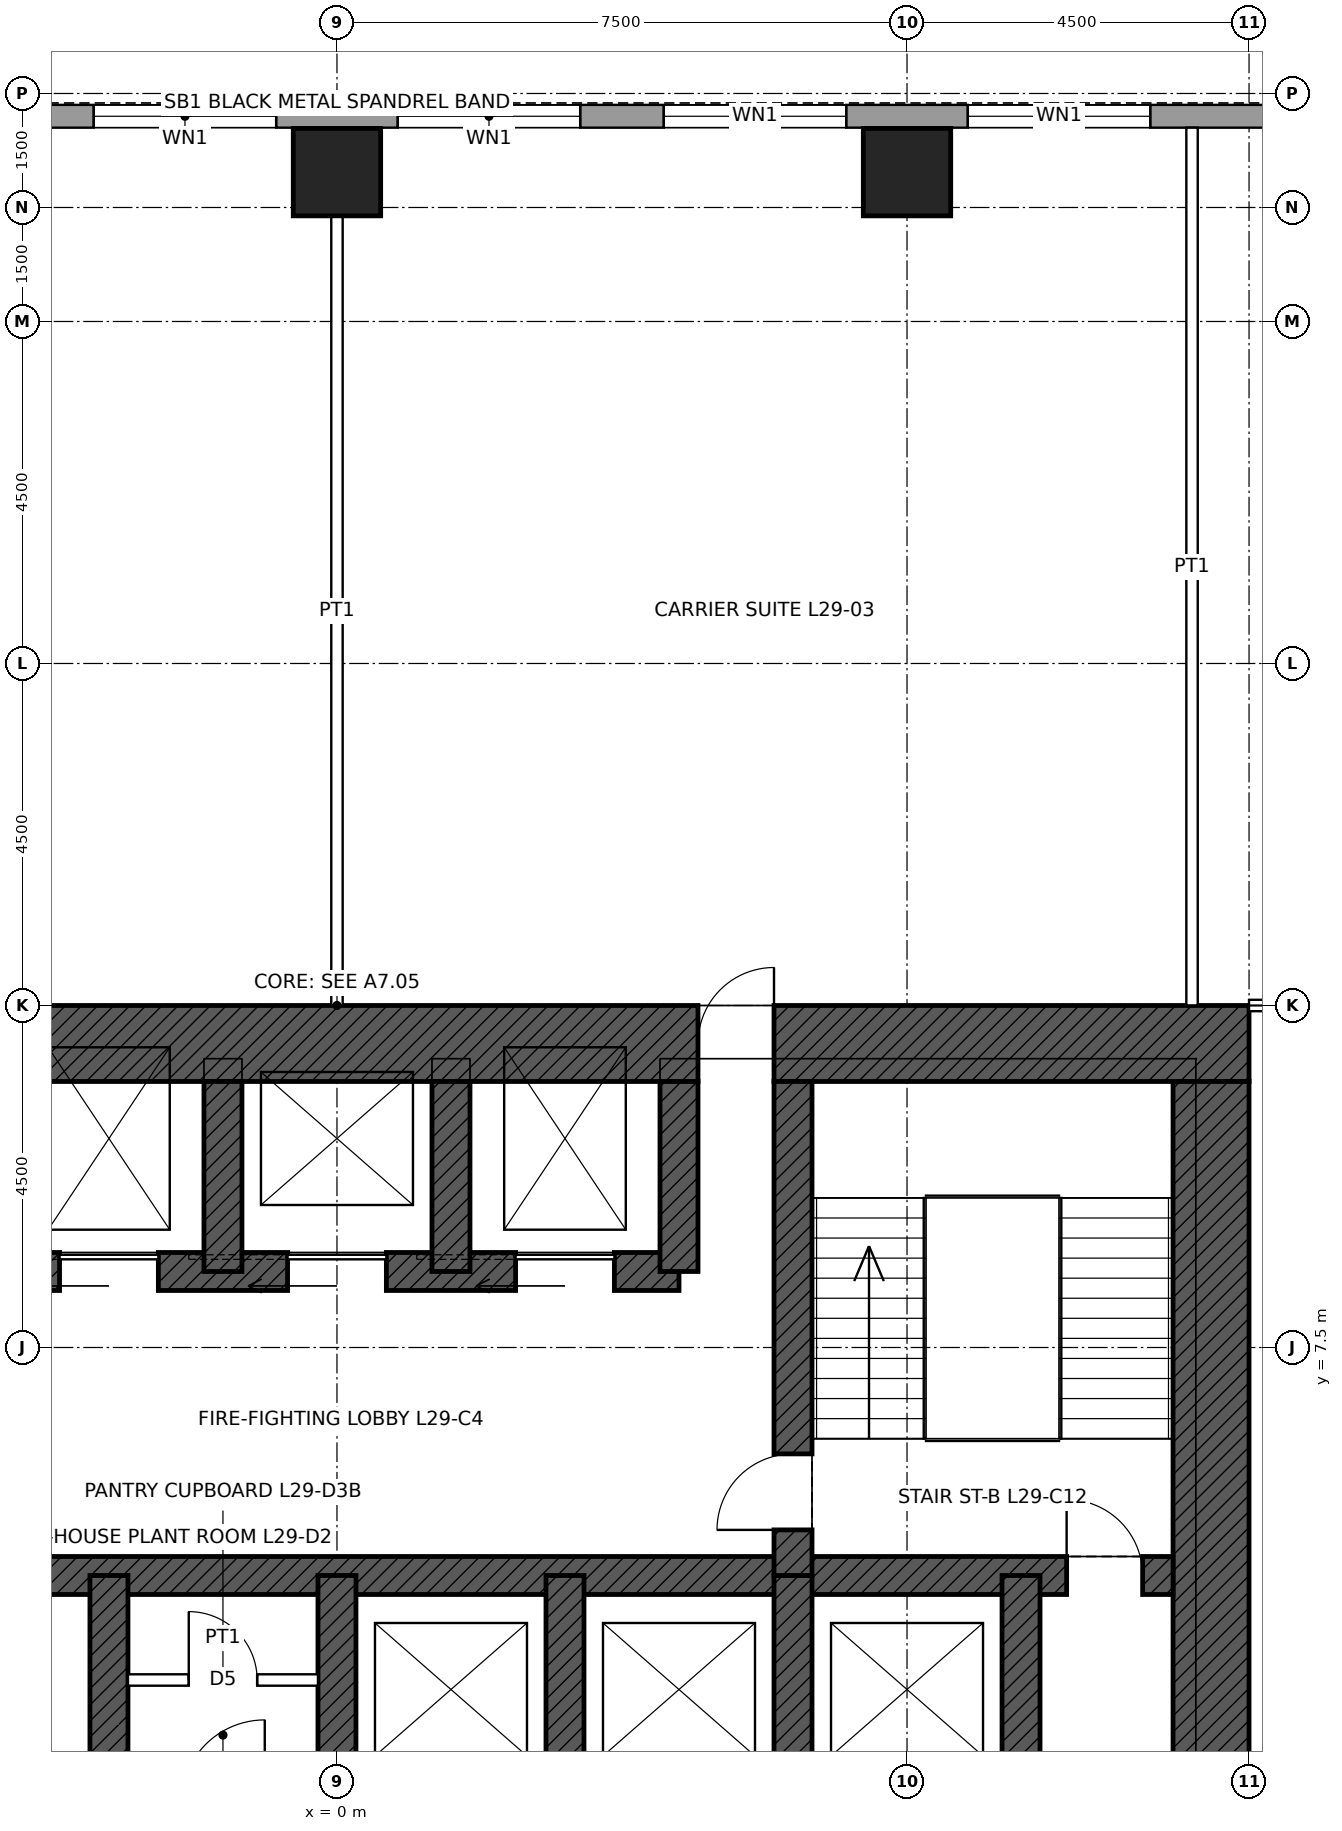
"""IFC4 building model, lengths in metres.
Left out: names, types, materials, properties, quantities, classifications, styles, units other than length and angle.
Written with IfcOpenShell. Run it as: python <this file> out.ifc"""

import sys

from ifc_helpers import new_model, si_unit, direction, frame, frame_2d, origin, origin_2d, place, context, subcontext, project, spatial, rectangle, hollow_rectangle, extrude, element, fill, save


model = new_model("IFC4")
c1 = context("Model", 3, precision=1e-05, world=origin(), true_north=direction((0.0, 1.0)))
c2 = subcontext(c1, "Body", "Model", "MODEL_VIEW")
j1 = project(units=[si_unit("LENGTHUNIT", "METRE"), si_unit("PLANEANGLEUNIT", "RADIAN")], contexts=[c1])
p1 = place(None, origin())
s1 = spatial("IfcSite", under=j1, at=p1, CompositionType="ELEMENT")
p2 = place(p1, origin())
s2 = spatial("IfcBuilding", under=s1, at=p2, CompositionType="ELEMENT")
p3 = place(p2, frame((0.0, 0.0, 144.9)))
s3 = spatial("IfcBuildingStorey", under=s2, at=p3, CompositionType="ELEMENT", Elevation=144.9)
for number, where, z_axis, x_axis in (
    (1, (0.0, 22.965, 0.0), (0.0, 0.0, 1.0), (1.0, 0.0, 0.0)),
    (2, (7.5, 22.965, 0.0), (0.0, 0.0, 1.0), (1.0, 0.0, 0.0)),
):
    element("IfcColumn", number, at=place(p3, frame(where, z_axis=z_axis, x_axis=x_axis)), inside=s3, PredefinedType="COLUMN", context=c2, shape_type="SweptSolid", body=[
        extrude(hollow_rectangle(XDim=1.15, YDim=1.15, WallThickness=0.075, at=origin_2d()), origin(), (0.0, 0.0, 1.0), 4.5),
    ])
p4 = place(p3, frame((-12.0, 11.5, 0.0), z_axis=(0.0, 0.0, 1.0), x_axis=(1.0, 0.0, 0.0)))
e3 = element("IfcWall", 3, at=p4, inside=s3, PredefinedType="SHEAR", context=c2, shape_type="SweptSolid", body=[
    extrude(rectangle(XDim=24.0, YDim=1.0, at=frame_2d((12.0, 0.0))), origin(), (0.0, 0.0, 1.0), 4.5),
])
p5 = place(p4, frame((6.25, 0.0, 0.0)))
e4 = element("IfcOpeningElement", 4, at=p5, cuts=e3, PredefinedType="OPENING", context=c2, shape_type="SweptSolid", body=[
    extrude(rectangle(XDim=1.0, YDim=2.4, at=frame_2d((0.5, 1.2))), frame((0.0, 0.51, 0.0), z_axis=(0.0, -1.0, 0.0), x_axis=(1.0, 0.0, 0.0)), (0.0, 0.0, 1.0), 1.02),
])
p6 = place(p4, frame((16.75, 0.0, 0.0)))
e5 = element("IfcOpeningElement", 5, at=p6, cuts=e3, PredefinedType="OPENING", context=c2, shape_type="SweptSolid", body=[
    extrude(rectangle(XDim=1.0, YDim=2.4, at=frame_2d((0.5, 1.2))), frame((0.0, 0.51, 0.0), z_axis=(0.0, -1.0, 0.0), x_axis=(1.0, 0.0, 0.0)), (0.0, 0.0, 1.0), 1.02),
])
p7 = place(p3, frame((11.5, 11.0, 0.0), z_axis=(0.0, 0.0, 1.0), x_axis=(0.0, -1.0, 0.0)))
e6 = element("IfcWall", 6, at=p7, inside=s3, PredefinedType="SHEAR", context=c2, shape_type="SweptSolid", body=[
    extrude(rectangle(XDim=22.0, YDim=1.0, at=frame_2d((11.0, 0.0))), origin(), (0.0, 0.0, 1.0), 4.5),
])
p8 = place(p7, frame((10.5, 0.0, 0.0)))
e7 = element("IfcOpeningElement", 7, at=p8, cuts=e6, PredefinedType="OPENING", context=c2, shape_type="SweptSolid", body=[
    extrude(rectangle(XDim=1.0, YDim=2.4, at=frame_2d((0.5, 1.2))), frame((0.0, 0.51, 0.0), z_axis=(0.0, -1.0, 0.0), x_axis=(1.0, 0.0, 0.0)), (0.0, 0.0, 1.0), 1.02),
])
p9 = place(p3, frame((-11.0, 4.5, 0.0), z_axis=(0.0, 0.0, 1.0), x_axis=(1.0, 0.0, 0.0)))
e8 = element("IfcWall", 8, at=p9, inside=s3, PredefinedType="SHEAR", context=c2, shape_type="SweptSolid", body=[
    extrude(rectangle(XDim=22.0, YDim=0.5, at=frame_2d((11.0, 0.0))), origin(), (0.0, 0.0, 1.0), 4.5),
])
p10 = place(p9, frame((0.4, 0.0, 0.0)))
e9 = element("IfcOpeningElement", 9, at=p10, cuts=e8, PredefinedType="OPENING", context=c2, shape_type="SweptSolid", body=[
    extrude(rectangle(XDim=1.0, YDim=2.1, at=frame_2d((0.5, 1.05))), frame((0.0, 0.26, 0.0), z_axis=(0.0, -1.0, 0.0), x_axis=(1.0, 0.0, 0.0)), (0.0, 0.0, 1.0), 0.52),
])
p11 = place(p9, frame((20.6, 0.0, 0.0)))
e10 = element("IfcOpeningElement", 10, at=p11, cuts=e8, PredefinedType="OPENING", context=c2, shape_type="SweptSolid", body=[
    extrude(rectangle(XDim=1.0, YDim=2.1, at=frame_2d((0.5, 1.05))), frame((0.0, 0.26, 0.0), z_axis=(0.0, -1.0, 0.0), x_axis=(1.0, 0.0, 0.0)), (0.0, 0.0, 1.0), 0.52),
])
p12 = place(p3, frame((-4.5, 8.5, 0.0), z_axis=(0.0, 0.0, 1.0), x_axis=(1.0, 0.0, 0.0)))
e11 = element("IfcWall", 11, at=p12, inside=s3, PredefinedType="SHEAR", context=c2, shape_type="SweptSolid", body=[
    extrude(rectangle(XDim=9.0, YDim=0.5, at=frame_2d((4.5, 0.0))), origin(), (0.0, 0.0, 1.0), 4.5),
])
p13 = place(p12, frame((0.85, 0.0, 0.0)))
e12 = element("IfcOpeningElement", 12, at=p13, cuts=e11, PredefinedType="OPENING", context=c2, shape_type="SweptSolid", body=[
    extrude(rectangle(XDim=1.3, YDim=2.4, at=frame_2d((0.65, 1.2))), frame((0.0, 0.26, 0.0), z_axis=(0.0, -1.0, 0.0), x_axis=(1.0, 0.0, 0.0)), (0.0, 0.0, 1.0), 0.52),
])
p14 = place(p12, frame((6.85, 0.0, 0.0)))
e13 = element("IfcOpeningElement", 13, at=p14, cuts=e11, PredefinedType="OPENING", context=c2, shape_type="SweptSolid", body=[
    extrude(rectangle(XDim=1.3, YDim=2.4, at=frame_2d((0.65, 1.2))), frame((0.0, 0.26, 0.0), z_axis=(0.0, -1.0, 0.0), x_axis=(1.0, 0.0, 0.0)), (0.0, 0.0, 1.0), 0.52),
])
p15 = place(p12, frame((3.85, 0.0, 0.0)))
e14 = element("IfcOpeningElement", 14, at=p15, cuts=e11, PredefinedType="OPENING", context=c2, shape_type="SweptSolid", body=[
    extrude(rectangle(XDim=1.3, YDim=2.4, at=frame_2d((0.65, 1.2))), frame((0.0, 0.26, 0.0), z_axis=(0.0, -1.0, 0.0), x_axis=(1.0, 0.0, 0.0)), (0.0, 0.0, 1.0), 0.52),
])
for number, where, z_axis, x_axis in (
    (15, (9.0, 1.5, 0.0), (0.0, 0.0, 1.0), (0.0, 1.0, 0.0)),
    (16, (-3.0, 1.5, 0.0), (0.0, 0.0, 1.0), (0.0, 1.0, 0.0)),
    (17, (0.0, 1.5, 0.0), (0.0, 0.0, 1.0), (0.0, 1.0, 0.0)),
    (18, (3.0, 1.5, 0.0), (0.0, 0.0, 1.0), (0.0, 1.0, 0.0)),
    (19, (6.0, 1.5, 0.0), (0.0, 0.0, 1.0), (0.0, 1.0, 0.0)),
):
    element("IfcWall", number, at=place(p3, frame(where, z_axis=z_axis, x_axis=x_axis)), inside=s3, PredefinedType="SHEAR", context=c2, shape_type="SweptSolid", body=[
        extrude(rectangle(XDim=3.0, YDim=0.5, at=frame_2d((1.5, 0.0))), origin(), (0.0, 0.0, 1.0), 4.5),
    ])
p16 = place(p3, frame((6.0, 4.5, 0.0), z_axis=(0.0, 0.0, 1.0), x_axis=(0.0, 1.0, 0.0)))
e20 = element("IfcWall", 20, at=p16, inside=s3, PredefinedType="SHEAR", context=c2, shape_type="SweptSolid", body=[
    extrude(rectangle(XDim=6.5, YDim=0.5, at=frame_2d((3.25, 0.0))), origin(), (0.0, 0.0, 1.0), 4.5),
])
p17 = place(p16, frame((0.6, 0.0, 0.0)))
e21 = element("IfcOpeningElement", 21, at=p17, cuts=e20, PredefinedType="OPENING", context=c2, shape_type="SweptSolid", body=[
    extrude(rectangle(XDim=1.0, YDim=2.1, at=frame_2d((0.5, 1.05))), frame((0.0, 0.26, 0.0), z_axis=(0.0, -1.0, 0.0), x_axis=(1.0, 0.0, 0.0)), (0.0, 0.0, 1.0), 0.52),
])
for number, where, z_axis, x_axis in (
    (22, (4.5, 8.5, 0.0), (0.0, 0.0, 1.0), (0.0, 1.0, 0.0)),
    (23, (-1.5, 8.5, 0.0), (0.0, 0.0, 1.0), (0.0, 1.0, 0.0)),
    (24, (1.5, 8.5, 0.0), (0.0, 0.0, 1.0), (0.0, 1.0, 0.0)),
):
    element("IfcWall", number, at=place(p3, frame(where, z_axis=z_axis, x_axis=x_axis)), inside=s3, PredefinedType="SHEAR", context=c2, shape_type="SweptSolid", body=[
        extrude(rectangle(XDim=2.5, YDim=0.5, at=frame_2d((1.25, 0.0))), origin(), (0.0, 0.0, 1.0), 4.5),
    ])
p18 = place(p3, frame((-16.2, 23.7, 0.0), z_axis=(0.0, 0.0, 1.0), x_axis=(1.0, 0.0, 0.0)))
e25 = element("IfcWall", 25, at=p18, inside=s3, PredefinedType="SOLIDWALL", context=c2, shape_type="SweptSolid", body=[
    extrude(rectangle(XDim=32.4, YDim=0.3, at=frame_2d((16.2, 0.0))), origin(), (0.0, 0.0, 1.0), 4.3),
])
p19 = place(p18, frame((0.95, 0.0, 1.0)))
e26 = element("IfcOpeningElement", 26, at=p19, cuts=e25, PredefinedType="OPENING", context=c2, shape_type="SweptSolid", body=[
    extrude(rectangle(XDim=1.8, YDim=1.2, at=frame_2d((0.9, 0.6))), frame((0.0, 0.16, 0.0), z_axis=(0.0, -1.0, 0.0), x_axis=(1.0, 0.0, 0.0)), (0.0, 0.0, 1.0), 0.32),
])
p20 = place(p18, frame((5.5, 0.0, 1.0)))
e27 = element("IfcOpeningElement", 27, at=p20, cuts=e25, PredefinedType="OPENING", context=c2, shape_type="SweptSolid", body=[
    extrude(rectangle(XDim=2.4, YDim=1.2, at=frame_2d((1.2, 0.6))), frame((0.0, 0.16, 0.0), z_axis=(0.0, -1.0, 0.0), x_axis=(1.0, 0.0, 0.0)), (0.0, 0.0, 1.0), 0.32),
])
p21 = place(p18, frame((9.5, 0.0, 1.0)))
e28 = element("IfcOpeningElement", 28, at=p21, cuts=e25, PredefinedType="OPENING", context=c2, shape_type="SweptSolid", body=[
    extrude(rectangle(XDim=2.4, YDim=1.2, at=frame_2d((1.2, 0.6))), frame((0.0, 0.16, 0.0), z_axis=(0.0, -1.0, 0.0), x_axis=(1.0, 0.0, 0.0)), (0.0, 0.0, 1.0), 0.32),
])
p22 = place(p18, frame((13.0, 0.0, 1.0)))
e29 = element("IfcOpeningElement", 29, at=p22, cuts=e25, PredefinedType="OPENING", context=c2, shape_type="SweptSolid", body=[
    extrude(rectangle(XDim=2.4, YDim=1.2, at=frame_2d((1.2, 0.6))), frame((0.0, 0.16, 0.0), z_axis=(0.0, -1.0, 0.0), x_axis=(1.0, 0.0, 0.0)), (0.0, 0.0, 1.0), 0.32),
])
p23 = place(p18, frame((17.0, 0.0, 1.0)))
e30 = element("IfcOpeningElement", 30, at=p23, cuts=e25, PredefinedType="OPENING", context=c2, shape_type="SweptSolid", body=[
    extrude(rectangle(XDim=2.4, YDim=1.2, at=frame_2d((1.2, 0.6))), frame((0.0, 0.16, 0.0), z_axis=(0.0, -1.0, 0.0), x_axis=(1.0, 0.0, 0.0)), (0.0, 0.0, 1.0), 0.32),
])
p24 = place(p18, frame((20.5, 0.0, 1.0)))
e31 = element("IfcOpeningElement", 31, at=p24, cuts=e25, PredefinedType="OPENING", context=c2, shape_type="SweptSolid", body=[
    extrude(rectangle(XDim=2.4, YDim=1.2, at=frame_2d((1.2, 0.6))), frame((0.0, 0.16, 0.0), z_axis=(0.0, -1.0, 0.0), x_axis=(1.0, 0.0, 0.0)), (0.0, 0.0, 1.0), 0.32),
])
p25 = place(p18, frame((24.5, 0.0, 1.0)))
e32 = element("IfcOpeningElement", 32, at=p25, cuts=e25, PredefinedType="OPENING", context=c2, shape_type="SweptSolid", body=[
    extrude(rectangle(XDim=2.4, YDim=1.2, at=frame_2d((1.2, 0.6))), frame((0.0, 0.16, 0.0), z_axis=(0.0, -1.0, 0.0), x_axis=(1.0, 0.0, 0.0)), (0.0, 0.0, 1.0), 0.32),
])
p26 = place(p18, frame((29.65, 0.0, 1.0)))
e33 = element("IfcOpeningElement", 33, at=p26, cuts=e25, PredefinedType="OPENING", context=c2, shape_type="SweptSolid", body=[
    extrude(rectangle(XDim=1.8, YDim=1.2, at=frame_2d((0.9, 0.6))), frame((0.0, 0.16, 0.0), z_axis=(0.0, -1.0, 0.0), x_axis=(1.0, 0.0, 0.0)), (0.0, 0.0, 1.0), 0.32),
])
p27 = place(p3, frame((12.0, 12.0, 0.0), z_axis=(0.0, 0.0, 1.0), x_axis=(1.0, 0.0, 0.0)))
e34 = element("IfcWall", 34, at=p27, inside=s3, PredefinedType="PARTITIONING", context=c2, shape_type="SweptSolid", body=[
    extrude(rectangle(XDim=2.075, YDim=0.15, at=frame_2d((1.038, 0.0))), origin(), (0.0, 0.0, 1.0), 3.284),
])
p28 = place(p27, frame((0.5, 0.0, 0.0)))
e35 = element("IfcOpeningElement", 35, at=p28, cuts=e34, PredefinedType="OPENING", context=c2, shape_type="SweptSolid", body=[
    extrude(rectangle(XDim=1.0, YDim=2.1, at=frame_2d((0.5, 1.05))), frame((0.0, 0.085, 0.0), z_axis=(0.0, -1.0, 0.0), x_axis=(1.0, 0.0, 0.0)), (0.0, 0.0, 1.0), 0.17),
])
p29 = place(p3, frame((0.0, 12.0, 0.0), z_axis=(0.0, 0.0, 1.0), x_axis=(0.0, 1.0, 0.0)))
e36 = element("IfcWall", 36, at=p29, inside=s3, PredefinedType="PARTITIONING", context=c2, shape_type="SweptSolid", body=[
    extrude(rectangle(XDim=10.39, YDim=0.15, at=frame_2d((5.195, 0.0))), origin(), (0.0, 0.0, 1.0), 3.431),
])
p30 = place(p3, frame((11.25, 12.0, 0.0), z_axis=(0.0, 0.0, 1.0), x_axis=(0.0, 1.0, 0.0)))
e37 = element("IfcWall", 37, at=p30, inside=s3, PredefinedType="PARTITIONING", context=c2, shape_type="SweptSolid", body=[
    extrude(rectangle(XDim=11.55, YDim=0.15, at=frame_2d((5.775, 0.0))), origin(), (0.0, 0.0, 1.0), 3.431),
])
p31 = place(p3, frame((-2.75, 3.125, 0.0), z_axis=(0.0, 0.0, 1.0), x_axis=(1.0, 0.0, 0.0)))
e38 = element("IfcWall", 38, at=p31, inside=s3, PredefinedType="PARTITIONING", context=c2, shape_type="SweptSolid", body=[
    extrude(rectangle(XDim=2.5, YDim=0.15, at=frame_2d((1.25, 0.0))), origin(), (0.0, 0.0, 1.0), 4.25),
])
p32 = place(p31, frame((0.8, 0.0, 0.0)))
e39 = element("IfcOpeningElement", 39, at=p32, cuts=e38, PredefinedType="OPENING", context=c2, shape_type="SweptSolid", body=[
    extrude(rectangle(XDim=0.9, YDim=2.1, at=frame_2d((0.45, 1.05))), frame((0.0, 0.085, 0.0), z_axis=(0.0, -1.0, 0.0), x_axis=(1.0, 0.0, 0.0)), (0.0, 0.0, 1.0), 0.17),
])
p33 = place(p22, origin())
e40 = element("IfcWindow", 40, at=p33, inside=s3, PartitioningType="SINGLE_PANEL", PredefinedType="WINDOW", context=c2, shape_type="SweptSolid", body=[
    extrude(rectangle(XDim=2.4, YDim=1.2, at=frame_2d((1.2, 0.6))), frame((0.0, 0.03, 0.0), z_axis=(0.0, -1.0, 0.0), x_axis=(1.0, 0.0, 0.0)), (0.0, 0.0, 1.0), 0.06),
])
fill(e29, e40)
p34 = place(p23, origin())
e41 = element("IfcWindow", 41, at=p34, inside=s3, PartitioningType="SINGLE_PANEL", PredefinedType="WINDOW", context=c2, shape_type="SweptSolid", body=[
    extrude(rectangle(XDim=2.4, YDim=1.2, at=frame_2d((1.2, 0.6))), frame((0.0, 0.03, 0.0), z_axis=(0.0, -1.0, 0.0), x_axis=(1.0, 0.0, 0.0)), (0.0, 0.0, 1.0), 0.06),
])
fill(e30, e41)
p35 = place(p24, origin())
e42 = element("IfcWindow", 42, at=p35, inside=s3, PartitioningType="SINGLE_PANEL", PredefinedType="WINDOW", context=c2, shape_type="SweptSolid", body=[
    extrude(rectangle(XDim=2.4, YDim=1.2, at=frame_2d((1.2, 0.6))), frame((0.0, 0.03, 0.0), z_axis=(0.0, -1.0, 0.0), x_axis=(1.0, 0.0, 0.0)), (0.0, 0.0, 1.0), 0.06),
])
fill(e31, e42)
p36 = place(p25, origin())
e43 = element("IfcWindow", 43, at=p36, inside=s3, PartitioningType="SINGLE_PANEL", PredefinedType="WINDOW", context=c2, shape_type="SweptSolid", body=[
    extrude(rectangle(XDim=2.4, YDim=1.2, at=frame_2d((1.2, 0.6))), frame((0.0, 0.03, 0.0), z_axis=(0.0, -1.0, 0.0), x_axis=(1.0, 0.0, 0.0)), (0.0, 0.0, 1.0), 0.06),
])
fill(e32, e43)
p37 = place(p11, origin())
e44 = element("IfcDoor", 44, at=p37, inside=s3, OperationType="SINGLE_SWING_LEFT", PredefinedType="DOOR", context=c2, shape_type="SweptSolid", body=[
    extrude(rectangle(XDim=1.0, YDim=2.1, at=frame_2d((0.5, 1.05))), frame((0.0, 0.025, 0.0), z_axis=(0.0, -1.0, 0.0), x_axis=(1.0, 0.0, 0.0)), (0.0, 0.0, 1.0), 0.05),
])
fill(e10, e44)
p38 = place(p17, origin())
e45 = element("IfcDoor", 45, at=p38, inside=s3, OperationType="SINGLE_SWING_LEFT", PredefinedType="DOOR", context=c2, shape_type="SweptSolid", body=[
    extrude(rectangle(XDim=1.0, YDim=2.1, at=frame_2d((0.5, 1.05))), frame((0.0, 0.025, 0.0), z_axis=(0.0, -1.0, 0.0), x_axis=(1.0, 0.0, 0.0)), (0.0, 0.0, 1.0), 0.05),
])
fill(e21, e45)
p39 = place(p6, origin())
e46 = element("IfcDoor", 46, at=p39, inside=s3, OperationType="SINGLE_SWING_RIGHT", PredefinedType="DOOR", context=c2, shape_type="SweptSolid", body=[
    extrude(rectangle(XDim=1.0, YDim=2.4, at=frame_2d((0.5, 1.2))), frame((0.0, 0.485, 0.0), z_axis=(0.0, -1.0, 0.0), x_axis=(1.0, 0.0, 0.0)), (0.0, 0.0, 1.0), 0.05),
])
fill(e5, e46)
p40 = place(p13, origin())
e47 = element("IfcDoor", 47, at=p40, inside=s3, OperationType="SLIDING_TO_LEFT", PredefinedType="DOOR", context=c2, shape_type="SweptSolid", body=[
    extrude(rectangle(XDim=1.3, YDim=2.4, at=frame_2d((0.65, 1.2))), frame((0.0, 0.025, 0.0), z_axis=(0.0, -1.0, 0.0), x_axis=(1.0, 0.0, 0.0)), (0.0, 0.0, 1.0), 0.05),
])
fill(e12, e47)
p41 = place(p14, origin())
e48 = element("IfcDoor", 48, at=p41, inside=s3, OperationType="SLIDING_TO_LEFT", PredefinedType="DOOR", context=c2, shape_type="SweptSolid", body=[
    extrude(rectangle(XDim=1.3, YDim=2.4, at=frame_2d((0.65, 1.2))), frame((0.0, 0.025, 0.0), z_axis=(0.0, -1.0, 0.0), x_axis=(1.0, 0.0, 0.0)), (0.0, 0.0, 1.0), 0.05),
])
fill(e13, e48)
p42 = place(p15, origin())
e49 = element("IfcDoor", 49, at=p42, inside=s3, OperationType="SLIDING_TO_LEFT", PredefinedType="DOOR", context=c2, shape_type="SweptSolid", body=[
    extrude(rectangle(XDim=1.3, YDim=2.4, at=frame_2d((0.65, 1.2))), frame((0.0, 0.025, 0.0), z_axis=(0.0, -1.0, 0.0), x_axis=(1.0, 0.0, 0.0)), (0.0, 0.0, 1.0), 0.05),
])
fill(e14, e49)
p43 = place(p32, origin())
e50 = element("IfcDoor", 50, at=p43, inside=s3, OperationType="SINGLE_SWING_LEFT", PredefinedType="DOOR", context=c2, shape_type="SweptSolid", body=[
    extrude(rectangle(XDim=0.9, YDim=2.1, at=frame_2d((0.45, 1.05))), frame((0.0, 0.025, 0.0), z_axis=(0.0, -1.0, 0.0), x_axis=(1.0, 0.0, 0.0)), (0.0, 0.0, 1.0), 0.05),
])
fill(e39, e50)
save(model, sys.argv[1])
